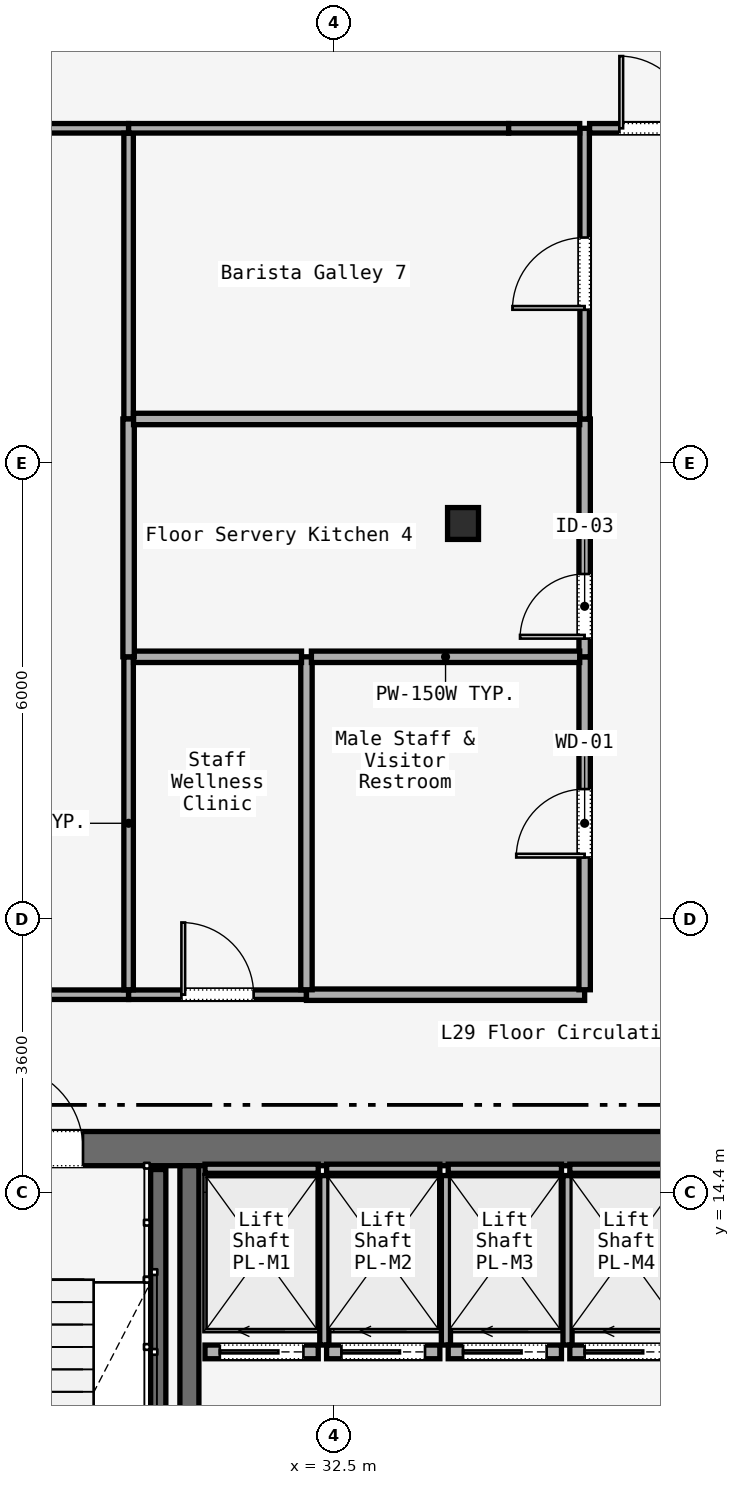
"""IFC4 building model, lengths in metres.
Left out: names, types, materials, properties, quantities, classifications, styles, units other than length and angle.
Written with IfcOpenShell. Run it as: python <this file> out.ifc"""

import sys

from ifc_helpers import new_model, si_unit, direction, frame, frame_2d, origin, origin_2d, place, context, subcontext, project, spatial, rectangle, i_section, extrude, element, fill, save


model = new_model("IFC4")
c1 = context("Model", 3, precision=1e-05, world=origin(), true_north=direction((0.0, 1.0)))
c2 = subcontext(c1, "Body", "Model", "MODEL_VIEW")
j1 = project(units=[si_unit("LENGTHUNIT", "METRE"), si_unit("PLANEANGLEUNIT", "RADIAN")], contexts=[c1])
p1 = place(None, origin())
s1 = spatial("IfcSite", under=j1, at=p1, CompositionType="ELEMENT")
p2 = place(p1, origin())
s2 = spatial("IfcBuilding", under=s1, at=p2, CompositionType="ELEMENT")
p3 = place(p2, frame((0.0, 0.0, 127.0)))
s3 = spatial("IfcBuildingStorey", under=s2, at=p3, CompositionType="ELEMENT", Elevation=127.0)
p4 = place(p3, frame((26.45, 14.975, 0.0), z_axis=(0.0, 0.0, 1.0), x_axis=(1.0, 0.0, 0.0)))
e1 = element("IfcWall", 1, at=p4, inside=s3, PredefinedType="SOLIDWALL", context=c2, shape_type="SweptSolid", body=[
    extrude(rectangle(XDim=31.1, YDim=0.45, at=frame_2d((15.55, 0.0))), origin(), (0.0, 0.0, 1.0), 3.58),
])
p5 = place(p4, frame((1.65, 0.0, 0.0)))
e2 = element("IfcOpeningElement", 2, at=p5, cuts=e1, PredefinedType="OPENING", context=c2, shape_type="SweptSolid", body=[
    extrude(rectangle(XDim=1.1, YDim=2.2, at=frame_2d((0.55, 1.1))), frame((0.0, 0.225, 0.0), z_axis=(0.0, -1.0, 0.0), x_axis=(1.0, 0.0, 0.0)), (0.0, 0.0, 1.0), 0.45),
])
p6 = place(p4, frame((13.65, 0.0, 0.0)))
e3 = element("IfcOpeningElement", 3, at=p6, cuts=e1, PredefinedType="OPENING", context=c2, shape_type="SweptSolid", body=[
    extrude(rectangle(XDim=1.1, YDim=2.2, at=frame_2d((0.55, 1.1))), frame((0.0, 0.225, 0.0), z_axis=(0.0, -1.0, 0.0), x_axis=(1.0, 0.0, 0.0)), (0.0, 0.0, 1.0), 0.45),
])
p7 = place(p4, frame((25.55, 0.0, 0.0)))
e4 = element("IfcOpeningElement", 4, at=p7, cuts=e1, PredefinedType="OPENING", context=c2, shape_type="SweptSolid", body=[
    extrude(rectangle(XDim=1.1, YDim=2.2, at=frame_2d((0.55, 1.1))), frame((0.0, 0.225, 0.0), z_axis=(0.0, -1.0, 0.0), x_axis=(1.0, 0.0, 0.0)), (0.0, 0.0, 1.0), 0.45),
])
p8 = place(p4, frame((10.7, 0.0, 0.0)))
e5 = element("IfcOpeningElement", 5, at=p8, cuts=e1, PredefinedType="OPENING", context=c2, shape_type="SweptSolid", body=[
    extrude(rectangle(XDim=1.4, YDim=2.2, at=frame_2d((0.7, 1.1))), frame((0.0, 0.225, 0.0), z_axis=(0.0, -1.0, 0.0), x_axis=(1.0, 0.0, 0.0)), (0.0, 0.0, 1.0), 0.45),
])
p9 = place(p4, frame((19.35, 0.0, 0.0)))
e6 = element("IfcOpeningElement", 6, at=p9, cuts=e1, PredefinedType="OPENING", context=c2, shape_type="SweptSolid", body=[
    extrude(rectangle(XDim=1.1, YDim=2.2, at=frame_2d((0.55, 1.1))), frame((0.0, 0.225, 0.0), z_axis=(0.0, -1.0, 0.0), x_axis=(1.0, 0.0, 0.0)), (0.0, 0.0, 1.0), 0.45),
])
p10 = place(p4, frame((21.4, 0.0, 0.0)))
e7 = element("IfcOpeningElement", 7, at=p10, cuts=e1, PredefinedType="OPENING", context=c2, shape_type="SweptSolid", body=[
    extrude(rectangle(XDim=0.9, YDim=2.1, at=frame_2d((0.45, 1.05))), frame((0.0, 0.225, 0.0), z_axis=(0.0, -1.0, 0.0), x_axis=(1.0, 0.0, 0.0)), (0.0, 0.0, 1.0), 0.45),
])
p11 = place(p4, frame((23.35, 0.0, 0.0)))
e8 = element("IfcOpeningElement", 8, at=p11, cuts=e1, PredefinedType="OPENING", context=c2, shape_type="SweptSolid", body=[
    extrude(rectangle(XDim=1.3, YDim=2.3, at=frame_2d((0.65, 1.15))), frame((0.0, 0.225, 0.0), z_axis=(0.0, -1.0, 0.0), x_axis=(1.0, 0.0, 0.0)), (0.0, 0.0, 1.0), 0.45),
])
p12 = place(p3, frame((30.6, 5.85, 0.0), z_axis=(0.0, 0.0, 1.0), x_axis=(0.0, 1.0, 0.0)))
e9 = element("IfcWall", 9, at=p12, inside=s3, PredefinedType="SOLIDWALL", context=c2, shape_type="SweptSolid", body=[
    extrude(rectangle(XDim=8.9, YDim=0.25, at=frame_2d((4.45, 0.0))), origin(), (0.0, 0.0, 1.0), 3.58),
])
p13 = place(p3, frame((34.2, 23.2, 0.0), z_axis=(0.0, 0.0, 1.0), x_axis=(1.0, 0.0, 0.0)))
e10 = element("IfcColumn", 10, at=p13, inside=s3, PredefinedType="COLUMN", context=c2, shape_type="SweptSolid", body=[
    extrude(i_section(OverallWidth=0.407, OverallDepth=0.419, WebThickness=0.031, FlangeThickness=0.049, FilletRadius=0.015, at=origin_2d()), origin(), (0.0, 0.0, 1.0), 3.58),
])
p14 = place(p3, frame((30.19, 14.7, 0.0), z_axis=(0.0, 0.0, 1.0), x_axis=(0.0, -1.0, 0.0)))
e11 = element("IfcWall", 11, at=p14, inside=s3, PredefinedType="SOLIDWALL", context=c2, shape_type="SweptSolid", body=[
    extrude(rectangle(XDim=7.65, YDim=0.2, at=frame_2d((3.825, 0.0))), origin(), (0.0, 0.0, 1.0), 3.8),
])
p15 = place(p3, frame((30.805, 12.3, 0.0), z_axis=(0.0, 0.0, 1.0), x_axis=(1.0, 0.0, 0.0)))
e12 = element("IfcWall", 12, at=p15, inside=s3, PredefinedType="SOLIDWALL", context=c2, shape_type="SweptSolid", body=[
    extrude(rectangle(XDim=1.49, YDim=0.18, at=frame_2d((0.745, 0.0))), origin(), (0.0, 0.0, 1.0), 3.01),
])
p16 = place(p15, frame((0.195, 0.0, 0.0)))
e13 = element("IfcOpeningElement", 13, at=p16, cuts=e12, PredefinedType="OPENING", context=c2, shape_type="SweptSolid", body=[
    extrude(rectangle(XDim=1.1, YDim=2.2, at=frame_2d((0.55, 1.1))), frame((0.0, 0.09, 0.0), z_axis=(0.0, -1.0, 0.0), x_axis=(1.0, 0.0, 0.0)), (0.0, 0.0, 1.0), 0.18),
])
p17 = place(p3, frame((30.805, 14.71, 0.0), z_axis=(0.0, 0.0, 1.0), x_axis=(1.0, 0.0, 0.0)))
e14 = element("IfcWall", 14, at=p17, inside=s3, PredefinedType="SOLIDWALL", context=c2, shape_type="SweptSolid", body=[
    extrude(rectangle(XDim=1.49, YDim=0.12, at=frame_2d((0.745, 0.0))), origin(), (0.0, 0.0, 1.0), 3.01),
])
p18 = place(p3, frame((32.375, 12.39, 0.0), z_axis=(0.0, 0.0, 1.0), x_axis=(0.0, 1.0, 0.0)))
e15 = element("IfcWall", 15, at=p18, inside=s3, PredefinedType="SOLIDWALL", context=c2, shape_type="SweptSolid", body=[
    extrude(rectangle(XDim=2.23, YDim=0.12, at=frame_2d((1.115, 0.0))), origin(), (0.0, 0.0, 1.0), 3.01),
])
p19 = place(p3, frame((32.405, 12.3, 0.0), z_axis=(0.0, 0.0, 1.0), x_axis=(1.0, 0.0, 0.0)))
e16 = element("IfcWall", 16, at=p19, inside=s3, PredefinedType="SOLIDWALL", context=c2, shape_type="SweptSolid", body=[
    extrude(rectangle(XDim=1.49, YDim=0.18, at=frame_2d((0.745, 0.0))), origin(), (0.0, 0.0, 1.0), 3.01),
])
p20 = place(p19, frame((0.195, 0.0, 0.0)))
e17 = element("IfcOpeningElement", 17, at=p20, cuts=e16, PredefinedType="OPENING", context=c2, shape_type="SweptSolid", body=[
    extrude(rectangle(XDim=1.1, YDim=2.2, at=frame_2d((0.55, 1.1))), frame((0.0, 0.09, 0.0), z_axis=(0.0, -1.0, 0.0), x_axis=(1.0, 0.0, 0.0)), (0.0, 0.0, 1.0), 0.18),
])
p21 = place(p3, frame((32.405, 14.71, 0.0), z_axis=(0.0, 0.0, 1.0), x_axis=(1.0, 0.0, 0.0)))
e18 = element("IfcWall", 18, at=p21, inside=s3, PredefinedType="SOLIDWALL", context=c2, shape_type="SweptSolid", body=[
    extrude(rectangle(XDim=1.49, YDim=0.12, at=frame_2d((0.745, 0.0))), origin(), (0.0, 0.0, 1.0), 3.01),
])
p22 = place(p3, frame((33.975, 12.39, 0.0), z_axis=(0.0, 0.0, 1.0), x_axis=(0.0, 1.0, 0.0)))
e19 = element("IfcWall", 19, at=p22, inside=s3, PredefinedType="SOLIDWALL", context=c2, shape_type="SweptSolid", body=[
    extrude(rectangle(XDim=2.23, YDim=0.12, at=frame_2d((1.115, 0.0))), origin(), (0.0, 0.0, 1.0), 3.01),
])
p23 = place(p3, frame((34.005, 12.3, 0.0), z_axis=(0.0, 0.0, 1.0), x_axis=(1.0, 0.0, 0.0)))
e20 = element("IfcWall", 20, at=p23, inside=s3, PredefinedType="SOLIDWALL", context=c2, shape_type="SweptSolid", body=[
    extrude(rectangle(XDim=1.49, YDim=0.18, at=frame_2d((0.745, 0.0))), origin(), (0.0, 0.0, 1.0), 3.01),
])
p24 = place(p23, frame((0.195, 0.0, 0.0)))
e21 = element("IfcOpeningElement", 21, at=p24, cuts=e20, PredefinedType="OPENING", context=c2, shape_type="SweptSolid", body=[
    extrude(rectangle(XDim=1.1, YDim=2.2, at=frame_2d((0.55, 1.1))), frame((0.0, 0.09, 0.0), z_axis=(0.0, -1.0, 0.0), x_axis=(1.0, 0.0, 0.0)), (0.0, 0.0, 1.0), 0.18),
])
p25 = place(p3, frame((34.005, 14.71, 0.0), z_axis=(0.0, 0.0, 1.0), x_axis=(1.0, 0.0, 0.0)))
e22 = element("IfcWall", 22, at=p25, inside=s3, PredefinedType="SOLIDWALL", context=c2, shape_type="SweptSolid", body=[
    extrude(rectangle(XDim=1.49, YDim=0.12, at=frame_2d((0.745, 0.0))), origin(), (0.0, 0.0, 1.0), 3.01),
])
p26 = place(p3, frame((35.575, 12.39, 0.0), z_axis=(0.0, 0.0, 1.0), x_axis=(0.0, 1.0, 0.0)))
e23 = element("IfcWall", 23, at=p26, inside=s3, PredefinedType="SOLIDWALL", context=c2, shape_type="SweptSolid", body=[
    extrude(rectangle(XDim=2.23, YDim=0.12, at=frame_2d((1.115, 0.0))), origin(), (0.0, 0.0, 1.0), 3.01),
])
p27 = place(p3, frame((35.605, 12.3, 0.0), z_axis=(0.0, 0.0, 1.0), x_axis=(1.0, 0.0, 0.0)))
e24 = element("IfcWall", 24, at=p27, inside=s3, PredefinedType="SOLIDWALL", context=c2, shape_type="SweptSolid", body=[
    extrude(rectangle(XDim=1.49, YDim=0.18, at=frame_2d((0.745, 0.0))), origin(), (0.0, 0.0, 1.0), 3.01),
])
p28 = place(p27, frame((0.195, 0.0, 0.0)))
e25 = element("IfcOpeningElement", 25, at=p28, cuts=e24, PredefinedType="OPENING", context=c2, shape_type="SweptSolid", body=[
    extrude(rectangle(XDim=1.1, YDim=2.2, at=frame_2d((0.55, 1.1))), frame((0.0, 0.09, 0.0), z_axis=(0.0, -1.0, 0.0), x_axis=(1.0, 0.0, 0.0)), (0.0, 0.0, 1.0), 0.18),
])
p29 = place(p3, frame((35.605, 14.71, 0.0), z_axis=(0.0, 0.0, 1.0), x_axis=(1.0, 0.0, 0.0)))
e26 = element("IfcWall", 26, at=p29, inside=s3, PredefinedType="SOLIDWALL", context=c2, shape_type="SweptSolid", body=[
    extrude(rectangle(XDim=1.49, YDim=0.12, at=frame_2d((0.745, 0.0))), origin(), (0.0, 0.0, 1.0), 3.01),
])
p30 = place(p3, frame((25.665, 17.0, 0.0), z_axis=(0.0, 0.0, 1.0), x_axis=(1.0, 0.0, 0.0)))
e27 = element("IfcWall", 27, at=p30, inside=s3, PredefinedType="PARTITIONING", context=c2, shape_type="SweptSolid", body=[
    extrude(rectangle(XDim=4.135, YDim=0.125, at=frame_2d((2.067, 0.0))), origin(), (0.0, 0.0, 1.0), 3.01),
])
p31 = place(p30, frame((1.593, 0.0, 0.0)))
e28 = element("IfcOpeningElement", 28, at=p31, cuts=e27, PredefinedType="OPENING", context=c2, shape_type="SweptSolid", body=[
    extrude(rectangle(XDim=0.95, YDim=2.2, at=frame_2d((0.475, 1.1))), frame((0.0, 0.062, 0.0), z_axis=(0.0, -1.0, 0.0), x_axis=(1.0, 0.0, 0.0)), (0.0, 0.0, 1.0), 0.125),
])
p32 = place(p3, frame((29.8, 17.0, 0.0), z_axis=(0.0, 0.0, 1.0), x_axis=(1.0, 0.0, 0.0)))
e29 = element("IfcWall", 29, at=p32, inside=s3, PredefinedType="PARTITIONING", context=c2, shape_type="SweptSolid", body=[
    extrude(rectangle(XDim=2.34, YDim=0.125, at=frame_2d((1.17, 0.0))), origin(), (0.0, 0.0, 1.0), 3.01),
])
p33 = place(p32, frame((0.695, 0.0, 0.0)))
e30 = element("IfcOpeningElement", 30, at=p33, cuts=e29, PredefinedType="OPENING", context=c2, shape_type="SweptSolid", body=[
    extrude(rectangle(XDim=0.95, YDim=2.2, at=frame_2d((0.475, 1.1))), frame((0.0, 0.062, 0.0), z_axis=(0.0, -1.0, 0.0), x_axis=(1.0, 0.0, 0.0)), (0.0, 0.0, 1.0), 0.125),
])
p34 = place(p3, frame((32.14, 17.0, 0.0), z_axis=(0.0, 0.0, 1.0), x_axis=(1.0, 0.0, 0.0)))
e31 = element("IfcWall", 31, at=p34, inside=s3, PredefinedType="PARTITIONING", context=c2, shape_type="SweptSolid", body=[
    extrude(rectangle(XDim=3.66, YDim=0.15, at=frame_2d((1.83, 0.0))), origin(), (0.0, 0.0, 1.0), 3.01),
])
p35 = place(p3, frame((35.8, 17.065, 0.0), z_axis=(0.0, 0.0, 1.0), x_axis=(0.0, 1.0, 0.0)))
e32 = element("IfcWall", 32, at=p35, inside=s3, PredefinedType="PARTITIONING", context=c2, shape_type="SweptSolid", body=[
    extrude(rectangle(XDim=4.381, YDim=0.15, at=frame_2d((2.19, 0.0))), origin(), (0.0, 0.0, 1.0), 3.01),
])
p36 = place(p35, frame((1.74, 0.0, 0.0)))
e33 = element("IfcOpeningElement", 33, at=p36, cuts=e32, PredefinedType="OPENING", context=c2, shape_type="SweptSolid", body=[
    extrude(rectangle(XDim=0.9, YDim=2.15, at=frame_2d((0.45, 1.075))), frame((0.0, 0.075, 0.0), z_axis=(0.0, -1.0, 0.0), x_axis=(1.0, 0.0, 0.0)), (0.0, 0.0, 1.0), 0.15),
])
p37 = place(p3, frame((35.8, 21.446, 0.0), z_axis=(0.0, 0.0, 1.0), x_axis=(0.0, 1.0, 0.0)))
e34 = element("IfcWall", 34, at=p37, inside=s3, PredefinedType="PARTITIONING", context=c2, shape_type="SweptSolid", body=[
    extrude(rectangle(XDim=3.129, YDim=0.15, at=frame_2d((1.564, 0.0))), origin(), (0.0, 0.0, 1.0), 3.01),
])
p38 = place(p37, frame((0.24, 0.0, 0.0)))
e35 = element("IfcOpeningElement", 35, at=p38, cuts=e34, PredefinedType="OPENING", context=c2, shape_type="SweptSolid", body=[
    extrude(rectangle(XDim=0.85, YDim=2.15, at=frame_2d((0.425, 1.075))), frame((0.0, 0.075, 0.0), z_axis=(0.0, -1.0, 0.0), x_axis=(1.0, 0.0, 0.0)), (0.0, 0.0, 1.0), 0.15),
])
p39 = place(p3, frame((35.8, 24.575, 0.0), z_axis=(0.0, 0.0, 1.0), x_axis=(0.0, 1.0, 0.0)))
e36 = element("IfcWall", 36, at=p39, inside=s3, PredefinedType="PARTITIONING", context=c2, shape_type="SweptSolid", body=[
    extrude(rectangle(XDim=3.825, YDim=0.125, at=frame_2d((1.912, 0.0))), origin(), (0.0, 0.0, 1.0), 3.01),
])
p40 = place(p39, frame((1.437, 0.0, 0.0)))
e37 = element("IfcOpeningElement", 37, at=p40, cuts=e36, PredefinedType="OPENING", context=c2, shape_type="SweptSolid", body=[
    extrude(rectangle(XDim=0.95, YDim=2.2, at=frame_2d((0.475, 1.1))), frame((0.0, 0.062, 0.0), z_axis=(0.0, -1.0, 0.0), x_axis=(1.0, 0.0, 0.0)), (0.0, 0.0, 1.0), 0.125),
])
p41 = place(p3, frame((35.865, 28.4, 0.0), z_axis=(0.0, 0.0, 1.0), x_axis=(1.0, 0.0, 0.0)))
e38 = element("IfcWall", 38, at=p41, inside=s3, PredefinedType="PARTITIONING", context=c2, shape_type="SweptSolid", body=[
    extrude(rectangle(XDim=1.735, YDim=0.125, at=frame_2d((0.868, 0.0))), origin(), (0.0, 0.0, 1.0), 3.01),
])
p42 = place(p41, frame((0.393, 0.0, 0.0)))
e39 = element("IfcOpeningElement", 39, at=p42, cuts=e38, PredefinedType="OPENING", context=c2, shape_type="SweptSolid", body=[
    extrude(rectangle(XDim=0.95, YDim=2.2, at=frame_2d((0.475, 1.1))), frame((0.0, 0.062, 0.0), z_axis=(0.0, -1.0, 0.0), x_axis=(1.0, 0.0, 0.0)), (0.0, 0.0, 1.0), 0.125),
])
p43 = place(p3, frame((32.14, 21.446, 0.0), z_axis=(0.0, 0.0, 1.0), x_axis=(0.0, -1.0, 0.0)))
e40 = element("IfcWall", 40, at=p43, inside=s3, PredefinedType="PARTITIONING", context=c2, shape_type="SweptSolid", body=[
    extrude(rectangle(XDim=4.381, YDim=0.15, at=frame_2d((2.19, 0.0))), origin(), (0.0, 0.0, 1.0), 3.01),
])
p44 = place(p3, frame((29.8, 17.065, 0.0), z_axis=(0.0, 0.0, 1.0), x_axis=(0.0, 1.0, 0.0)))
e41 = element("IfcWall", 41, at=p44, inside=s3, PredefinedType="PARTITIONING", context=c2, shape_type="SweptSolid", body=[
    extrude(rectangle(XDim=4.381, YDim=0.125, at=frame_2d((2.19, 0.0))), origin(), (0.0, 0.0, 1.0), 3.01),
])
p45 = place(p3, frame((29.865, 21.446, 0.0), z_axis=(0.0, 0.0, 1.0), x_axis=(1.0, 0.0, 0.0)))
e42 = element("IfcWall", 42, at=p45, inside=s3, PredefinedType="PARTITIONING", context=c2, shape_type="SweptSolid", body=[
    extrude(rectangle(XDim=2.21, YDim=0.15, at=frame_2d((1.105, 0.0))), origin(), (0.0, 0.0, 1.0), 3.01),
])
p46 = place(p3, frame((32.205, 21.446, 0.0), z_axis=(0.0, 0.0, 1.0), x_axis=(1.0, 0.0, 0.0)))
e43 = element("IfcWall", 43, at=p46, inside=s3, PredefinedType="PARTITIONING", context=c2, shape_type="SweptSolid", body=[
    extrude(rectangle(XDim=3.53, YDim=0.15, at=frame_2d((1.765, 0.0))), origin(), (0.0, 0.0, 1.0), 3.01),
])
p47 = place(p3, frame((25.639, 28.4, 0.0), z_axis=(0.0, 0.0, 1.0), x_axis=(1.0, 0.0, 0.0)))
e44 = element("IfcWall", 44, at=p47, inside=s3, PredefinedType="PARTITIONING", context=c2, shape_type="SweptSolid", body=[
    extrude(rectangle(XDim=4.161, YDim=0.125, at=frame_2d((2.08, 0.0))), origin(), (0.0, 0.0, 1.0), 3.01),
])
p48 = place(p3, frame((29.8, 28.335, 0.0), z_axis=(0.0, 0.0, 1.0), x_axis=(0.0, -1.0, 0.0)))
e45 = element("IfcWall", 45, at=p48, inside=s3, PredefinedType="PARTITIONING", context=c2, shape_type="SweptSolid", body=[
    extrude(rectangle(XDim=3.76, YDim=0.125, at=frame_2d((1.88, 0.0))), origin(), (0.0, 0.0, 1.0), 3.01),
])
p49 = place(p3, frame((29.8, 24.575, 0.0), z_axis=(0.0, 0.0, 1.0), x_axis=(0.0, -1.0, 0.0)))
e46 = element("IfcWall", 46, at=p49, inside=s3, PredefinedType="PARTITIONING", context=c2, shape_type="SweptSolid", body=[
    extrude(rectangle(XDim=3.129, YDim=0.15, at=frame_2d((1.564, 0.0))), origin(), (0.0, 0.0, 1.0), 3.01),
])
p50 = place(p3, frame((29.865, 24.575, 0.0), z_axis=(0.0, 0.0, 1.0), x_axis=(1.0, 0.0, 0.0)))
e47 = element("IfcWall", 47, at=p50, inside=s3, PredefinedType="PARTITIONING", context=c2, shape_type="SweptSolid", body=[
    extrude(rectangle(XDim=5.87, YDim=0.15, at=frame_2d((2.935, 0.0))), origin(), (0.0, 0.0, 1.0), 3.01),
])
p51 = place(p3, frame((29.8, 28.4, 0.0), z_axis=(0.0, 0.0, 1.0), x_axis=(1.0, 0.0, 0.0)))
e48 = element("IfcWall", 48, at=p51, inside=s3, PredefinedType="PARTITIONING", context=c2, shape_type="SweptSolid", body=[
    extrude(rectangle(XDim=5.0, YDim=0.125, at=frame_2d((2.5, 0.0))), origin(), (0.0, 0.0, 1.0), 3.01),
])
p52 = place(p3, frame((34.8, 28.4, 0.0), z_axis=(0.0, 0.0, 1.0), x_axis=(1.0, 0.0, 0.0)))
e49 = element("IfcWall", 49, at=p52, inside=s3, PredefinedType="PARTITIONING", context=c2, shape_type="SweptSolid", body=[
    extrude(rectangle(XDim=0.935, YDim=0.125, at=frame_2d((0.468, 0.0))), origin(), (0.0, 0.0, 1.0), 3.01),
])
p53 = place(p5, origin())
e50 = element("IfcDoor", 50, at=p53, inside=s3, OperationType="SINGLE_SWING_RIGHT", PredefinedType="DOOR", context=c2, shape_type="SweptSolid", body=[
    extrude(rectangle(XDim=1.1, YDim=2.2, at=frame_2d((0.55, 1.1))), frame((0.0, 0.025, 0.0), z_axis=(0.0, -1.0, 0.0), x_axis=(1.0, 0.0, 0.0)), (0.0, 0.0, 1.0), 0.05),
])
fill(e2, e50)
p54 = place(p16, origin())
e51 = element("IfcDoor", 51, at=p54, inside=s3, OperationType="SLIDING_TO_LEFT", PredefinedType="DOOR", context=c2, shape_type="SweptSolid", body=[
    extrude(rectangle(XDim=1.1, YDim=2.2, at=frame_2d((0.55, 1.1))), frame((0.0, 0.025, 0.0), z_axis=(0.0, -1.0, 0.0), x_axis=(1.0, 0.0, 0.0)), (0.0, 0.0, 1.0), 0.05),
])
fill(e13, e51)
p55 = place(p20, origin())
e52 = element("IfcDoor", 52, at=p55, inside=s3, OperationType="SLIDING_TO_LEFT", PredefinedType="DOOR", context=c2, shape_type="SweptSolid", body=[
    extrude(rectangle(XDim=1.1, YDim=2.2, at=frame_2d((0.55, 1.1))), frame((0.0, 0.025, 0.0), z_axis=(0.0, -1.0, 0.0), x_axis=(1.0, 0.0, 0.0)), (0.0, 0.0, 1.0), 0.05),
])
fill(e17, e52)
p56 = place(p24, origin())
e53 = element("IfcDoor", 53, at=p56, inside=s3, OperationType="SLIDING_TO_LEFT", PredefinedType="DOOR", context=c2, shape_type="SweptSolid", body=[
    extrude(rectangle(XDim=1.1, YDim=2.2, at=frame_2d((0.55, 1.1))), frame((0.0, 0.025, 0.0), z_axis=(0.0, -1.0, 0.0), x_axis=(1.0, 0.0, 0.0)), (0.0, 0.0, 1.0), 0.05),
])
fill(e21, e53)
p57 = place(p28, origin())
e54 = element("IfcDoor", 54, at=p57, inside=s3, OperationType="SLIDING_TO_LEFT", PredefinedType="DOOR", context=c2, shape_type="SweptSolid", body=[
    extrude(rectangle(XDim=1.1, YDim=2.2, at=frame_2d((0.55, 1.1))), frame((0.0, 0.025, 0.0), z_axis=(0.0, -1.0, 0.0), x_axis=(1.0, 0.0, 0.0)), (0.0, 0.0, 1.0), 0.05),
])
fill(e25, e54)
p58 = place(p33, origin())
e55 = element("IfcDoor", 55, at=p58, inside=s3, OperationType="SINGLE_SWING_RIGHT", PredefinedType="DOOR", context=c2, shape_type="SweptSolid", body=[
    extrude(rectangle(XDim=0.95, YDim=2.2, at=frame_2d((0.475, 1.1))), frame((0.0, 0.025, 0.0), z_axis=(0.0, -1.0, 0.0), x_axis=(1.0, 0.0, 0.0)), (0.0, 0.0, 1.0), 0.05),
])
fill(e30, e55)
p59 = place(p36, origin())
e56 = element("IfcDoor", 56, at=p59, inside=s3, OperationType="SINGLE_SWING_LEFT", PredefinedType="DOOR", context=c2, shape_type="SweptSolid", body=[
    extrude(rectangle(XDim=0.9, YDim=2.15, at=frame_2d((0.45, 1.075))), frame((0.0, 0.025, 0.0), z_axis=(0.0, -1.0, 0.0), x_axis=(1.0, 0.0, 0.0)), (0.0, 0.0, 1.0), 0.05),
])
fill(e33, e56)
p60 = place(p38, origin())
e57 = element("IfcDoor", 57, at=p60, inside=s3, OperationType="SINGLE_SWING_LEFT", PredefinedType="DOOR", context=c2, shape_type="SweptSolid", body=[
    extrude(rectangle(XDim=0.85, YDim=2.15, at=frame_2d((0.425, 1.075))), frame((0.0, 0.025, 0.0), z_axis=(0.0, -1.0, 0.0), x_axis=(1.0, 0.0, 0.0)), (0.0, 0.0, 1.0), 0.05),
])
fill(e35, e57)
p61 = place(p40, origin())
e58 = element("IfcDoor", 58, at=p61, inside=s3, OperationType="SINGLE_SWING_LEFT", PredefinedType="DOOR", context=c2, shape_type="SweptSolid", body=[
    extrude(rectangle(XDim=0.95, YDim=2.2, at=frame_2d((0.475, 1.1))), frame((0.0, 0.025, 0.0), z_axis=(0.0, -1.0, 0.0), x_axis=(1.0, 0.0, 0.0)), (0.0, 0.0, 1.0), 0.05),
])
fill(e37, e58)
p62 = place(p42, origin())
e59 = element("IfcDoor", 59, at=p62, inside=s3, OperationType="SINGLE_SWING_RIGHT", PredefinedType="DOOR", context=c2, shape_type="SweptSolid", body=[
    extrude(rectangle(XDim=0.95, YDim=2.2, at=frame_2d((0.475, 1.1))), frame((0.0, 0.025, 0.0), z_axis=(0.0, -1.0, 0.0), x_axis=(1.0, 0.0, 0.0)), (0.0, 0.0, 1.0), 0.05),
])
fill(e39, e59)
save(model, sys.argv[1])
